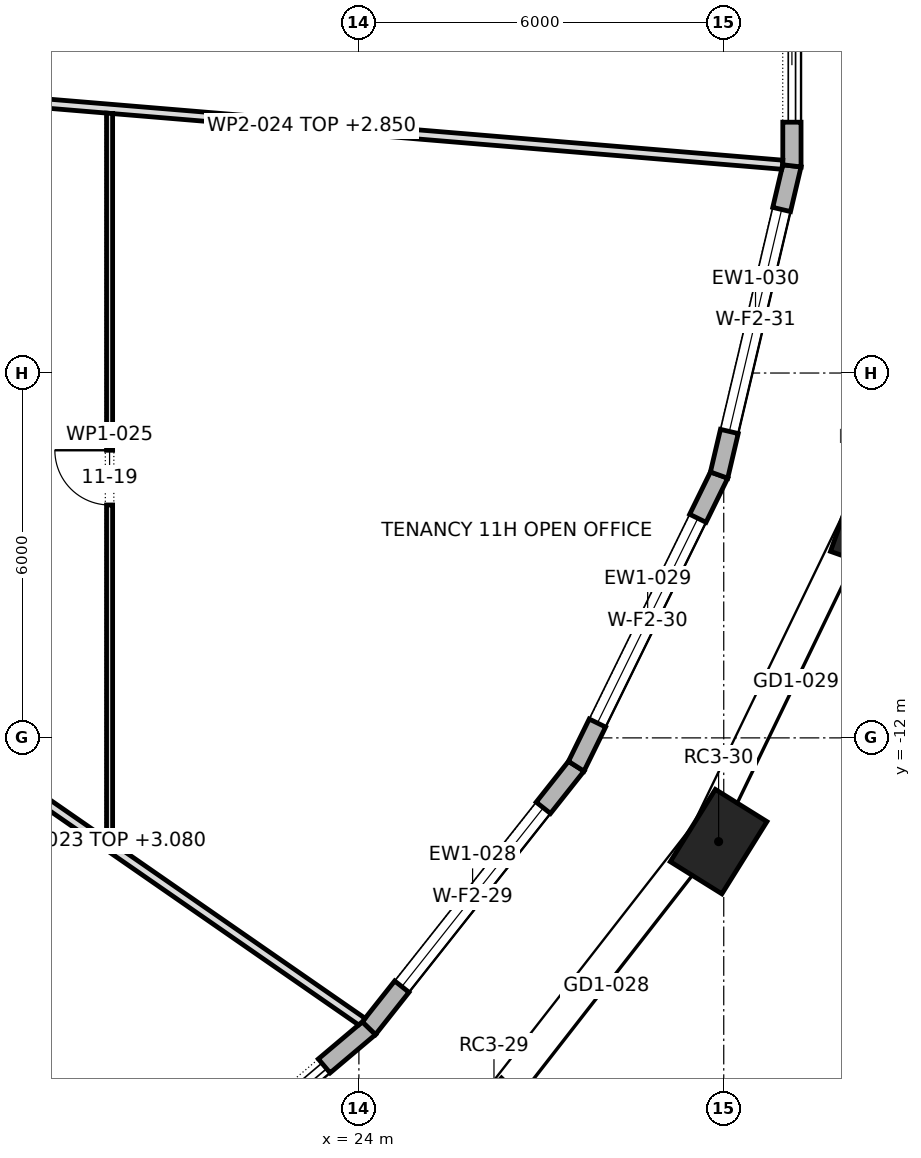
"""IFC4 building model, lengths in metres.
Left out: names, types, materials, properties, quantities, classifications, styles, units other than length and angle.
Written with IfcOpenShell. Run it as: python <this file> out.ifc"""

import sys

from ifc_helpers import new_model, si_unit, direction, frame, frame_2d, origin, origin_2d, place, context, subcontext, project, spatial, polyline, rectangle, outline, extrude, element, fill, save


model = new_model("IFC4")
c1 = context("Model", 3, precision=1e-05, world=origin(), true_north=direction((0.0, 1.0)))
c2 = subcontext(c1, "Body", "Model", "MODEL_VIEW")
j1 = project(units=[si_unit("LENGTHUNIT", "METRE"), si_unit("PLANEANGLEUNIT", "RADIAN")], contexts=[c1])
p1 = place(None, origin())
s1 = spatial("IfcSite", under=j1, at=p1, CompositionType="ELEMENT")
p2 = place(p1, origin())
s2 = spatial("IfcBuilding", under=s1, at=p2, CompositionType="ELEMENT")
p3 = place(p2, frame((0.0, 0.0, 163.3)))
s3 = spatial("IfcBuildingStorey", under=s2, at=p3, CompositionType="ELEMENT", Elevation=163.3)
for number, where, z_axis, x_axis in (
    (1, (26.221, -18.445, 0.0), (0.0, 0.0, 1.0), (0.692, 0.722, 0.0)),
    (2, (29.916, -13.706, 0.0), (0.0, 0.0, 1.0), (0.529, 0.849, 0.0)),
    (3, (32.46, -8.44, 0.0), (0.0, 0.0, 1.0), (0.334, 0.943, 0.0)),
):
    element("IfcColumn", number, at=place(p3, frame(where, z_axis=z_axis, x_axis=x_axis)), inside=s3, PredefinedType="COLUMN", context=c2, shape_type="SweptSolid", body=[
        extrude(rectangle(XDim=1.4, YDim=1.0, at=origin_2d()), origin(), (0.0, 0.0, 1.0), 4.2),
    ])
p4 = place(p3, frame((19.829, -20.435, 0.0), z_axis=(0.0, 0.0, 1.0), x_axis=(0.764076096085, 0.645126126732, 0.0)))
e4 = element("IfcWall", 4, at=p4, inside=s3, PredefinedType="STANDARD", context=c2, shape_type="SweptSolid", body=[
    extrude(outline(polyline([(-0.014, -0.15), (5.69, -0.15), (5.66, 0.15), (0.014, 0.15), (-0.014, -0.15)])), origin(), (0.0, 0.0, 1.0), 3.85),
])
p5 = place(p4, frame((0.962, 0.0, 0.0)))
e5 = element("IfcOpeningElement", 5, at=p5, cuts=e4, PredefinedType="OPENING", context=c2, shape_type="SweptSolid", body=[
    extrude(rectangle(XDim=3.75, YDim=3.45, at=frame_2d((1.875, 1.725))), frame((0.0, 0.162, 0.0), z_axis=(0.0, -1.0, 0.0), x_axis=(1.0, 0.0, 0.0)), (0.0, 0.0, 1.0), 0.324),
])
p6 = place(p3, frame((24.165, -16.774, 0.0), z_axis=(0.0, 0.0, 1.0), x_axis=(0.620577705153, 0.784144955902, 0.0)))
e6 = element("IfcWall", 6, at=p6, inside=s3, PredefinedType="STANDARD", context=c2, shape_type="SweptSolid", body=[
    extrude(outline(polyline([(-0.015, -0.15), (5.509, -0.15), (5.477, 0.15), (0.015, 0.15), (-0.015, -0.15)])), origin(), (0.0, 0.0, 1.0), 3.85),
])
p7 = place(p6, frame((0.871, 0.0, 0.6)))
e7 = element("IfcOpeningElement", 7, at=p7, cuts=e6, PredefinedType="OPENING", context=c2, shape_type="SweptSolid", body=[
    extrude(rectangle(XDim=3.75, YDim=2.85, at=frame_2d((1.875, 1.425))), frame((0.0, 0.162, 0.0), z_axis=(0.0, -1.0, 0.0), x_axis=(1.0, 0.0, 0.0)), (0.0, 0.0, 1.0), 0.324),
])
p8 = place(p3, frame((27.574, -12.467, 0.0), z_axis=(0.0, 0.0, 1.0), x_axis=(0.440444485575, 0.897779847806, 0.0)))
e8 = element("IfcWall", 8, at=p8, inside=s3, PredefinedType="STANDARD", context=c2, shape_type="SweptSolid", body=[
    extrude(outline(polyline([(-0.016, -0.15), (5.35, -0.15), (5.317, 0.15), (0.016, 0.15), (-0.016, -0.15)])), origin(), (0.0, 0.0, 1.0), 3.85),
])
p9 = place(p8, frame((0.792, 0.0, 0.6)))
e9 = element("IfcOpeningElement", 9, at=p9, cuts=e8, PredefinedType="OPENING", context=c2, shape_type="SweptSolid", body=[
    extrude(rectangle(XDim=3.75, YDim=2.85, at=frame_2d((1.875, 1.425))), frame((0.0, 0.162, 0.0), z_axis=(0.0, -1.0, 0.0), x_axis=(1.0, 0.0, 0.0)), (0.0, 0.0, 1.0), 0.324),
])
p10 = place(p3, frame((29.923, -7.678, 0.0), z_axis=(0.0, 0.0, 1.0), x_axis=(0.229297175564, 0.973356463624, 0.0)))
e10 = element("IfcWall", 10, at=p10, inside=s3, PredefinedType="STANDARD", context=c2, shape_type="SweptSolid", body=[
    extrude(outline(polyline([(-0.017, -0.15), (5.242, -0.15), (5.207, 0.15), (0.017, 0.15), (-0.017, -0.15)])), origin(), (0.0, 0.0, 1.0), 3.85),
])
p11 = place(p10, frame((0.737, 0.0, 0.6)))
e11 = element("IfcOpeningElement", 11, at=p11, cuts=e10, PredefinedType="OPENING", context=c2, shape_type="SweptSolid", body=[
    extrude(rectangle(XDim=3.75, YDim=2.85, at=frame_2d((1.875, 1.425))), frame((0.0, 0.162, 0.0), z_axis=(0.0, -1.0, 0.0), x_axis=(1.0, 0.0, 0.0)), (0.0, 0.0, 1.0), 0.324),
])
p12 = place(p3, frame((31.121, -2.593, 0.0), z_axis=(0.0, 0.0, 1.0), x_axis=(0.0, 1.0, 0.0)))
e12 = element("IfcWall", 12, at=p12, inside=s3, PredefinedType="STANDARD", context=c2, shape_type="SweptSolid", body=[
    extrude(outline(polyline([(-0.017, -0.15), (5.203, -0.15), (5.168, 0.15), (0.017, 0.15), (-0.017, -0.15)])), origin(), (0.0, 0.0, 1.0), 3.85),
])
p13 = place(p12, frame((0.718, 0.0, 0.0)))
e13 = element("IfcOpeningElement", 13, at=p13, cuts=e12, PredefinedType="OPENING", context=c2, shape_type="SweptSolid", body=[
    extrude(rectangle(XDim=3.75, YDim=3.45, at=frame_2d((1.875, 1.725))), frame((0.0, 0.162, 0.0), z_axis=(0.0, -1.0, 0.0), x_axis=(1.0, 0.0, 0.0)), (0.0, 0.0, 1.0), 0.324),
])
p14 = place(p3, frame((15.433, -10.692, 0.0), z_axis=(0.0, 0.0, 1.0), x_axis=(0.821818585553, -0.569749254006, 0.0)))
e14 = element("IfcWall", 14, at=p14, inside=s3, PredefinedType="PARTITIONING", context=c2, shape_type="SweptSolid", body=[
    extrude(outline(polyline([(0.104, -0.075), (1.832, -0.075), (3.56, -0.075), (5.288, -0.075), (7.016, -0.075), (8.744, -0.075), (10.472, -0.075), (10.493, 0.002), (10.497, 0.072), (10.497, 0.075), (8.773, 0.075), (7.049, 0.075), (5.325, 0.075), (5.324, 0.074), (5.323, 0.075), (3.549, 0.075), (1.774, 0.075), (0.0, 0.075), (0.0, 0.074), (0.104, -0.075)])), origin(), (0.0, 0.0, 1.0), 3.08),
])
p15 = place(p3, frame((15.469, -1.286, 0.0), z_axis=(0.0, 0.0, 1.0), x_axis=(0.996560145348, -0.082872653534, 0.0)))
e15 = element("IfcWall", 15, at=p15, inside=s3, PredefinedType="PARTITIONING", context=c2, shape_type="SweptSolid", body=[
    extrude(outline(polyline([(0.012, -0.075), (1.504, -0.075), (2.996, -0.075), (4.488, -0.075), (4.502, -0.074), (4.502, -0.075), (6.343, -0.075), (8.183, -0.075), (10.023, -0.075), (11.864, -0.075), (13.704, -0.075), (15.544, -0.075), (15.549, -0.045), (15.549, 0.075), (13.605, 0.075), (11.662, 0.075), (9.718, 0.075), (7.774, 0.075), (5.831, 0.075), (3.887, 0.075), (1.944, 0.075), (0.0, 0.075), (0.0, 0.07), (0.012, -0.075)])), origin(), (0.0, 0.0, 1.0), 2.85),
])
p16 = place(p3, frame((19.9, -1.726, 0.0), z_axis=(0.0, 0.0, 1.0), x_axis=(0.0, -1.0, 0.0)))
e16 = element("IfcWall", 16, at=p16, inside=s3, PredefinedType="PARTITIONING", context=c2, shape_type="SweptSolid", body=[
    extrude(outline(polyline([(0.0, -0.05), (1.99, -0.05), (3.979, -0.05), (5.969, -0.05), (7.959, -0.05), (9.948, -0.05), (11.938, -0.05), (12.007, 0.049), (12.007, 0.05), (10.007, 0.05), (8.007, 0.05), (6.007, 0.05), (4.008, 0.05), (2.008, 0.05), (0.008, 0.05), (0.0, -0.047), (0.0, -0.05)])), origin(), (0.0, 0.0, 1.0), 3.85),
])
p17 = place(p16, frame((5.544, 0.0, 0.0)))
e17 = element("IfcOpeningElement", 17, at=p17, cuts=e16, PredefinedType="OPENING", context=c2, shape_type="SweptSolid", body=[
    extrude(rectangle(XDim=0.9, YDim=2.1, at=frame_2d((0.45, 1.05))), frame((0.0, 0.062, 0.0), z_axis=(0.0, -1.0, 0.0), x_axis=(1.0, 0.0, 0.0)), (0.0, 0.0, 1.0), 0.124),
])
p18 = place(p5, origin())
e18 = element("IfcDoor", 18, at=p18, inside=s3, OperationType="DOUBLE_DOOR_SLIDING", PredefinedType="DOOR", context=c2, shape_type="SweptSolid", body=[
    extrude(rectangle(XDim=3.75, YDim=3.45, at=frame_2d((1.875, 1.725))), frame((0.0, 0.025, 0.0), z_axis=(0.0, -1.0, 0.0), x_axis=(1.0, 0.0, 0.0)), (0.0, 0.0, 1.0), 0.05),
])
fill(e5, e18)
p19 = place(p7, origin())
e19 = element("IfcWindow", 19, at=p19, inside=s3, PartitioningType="TRIPLE_PANEL_VERTICAL", PredefinedType="WINDOW", context=c2, shape_type="SweptSolid", body=[
    extrude(rectangle(XDim=3.75, YDim=2.85, at=frame_2d((1.875, 1.425))), frame((0.0, 0.03, 0.0), z_axis=(0.0, -1.0, 0.0), x_axis=(1.0, 0.0, 0.0)), (0.0, 0.0, 1.0), 0.06),
])
fill(e7, e19)
p20 = place(p9, origin())
e20 = element("IfcWindow", 20, at=p20, inside=s3, PartitioningType="TRIPLE_PANEL_VERTICAL", PredefinedType="WINDOW", context=c2, shape_type="SweptSolid", body=[
    extrude(rectangle(XDim=3.75, YDim=2.85, at=frame_2d((1.875, 1.425))), frame((0.0, 0.03, 0.0), z_axis=(0.0, -1.0, 0.0), x_axis=(1.0, 0.0, 0.0)), (0.0, 0.0, 1.0), 0.06),
])
fill(e9, e20)
p21 = place(p11, origin())
e21 = element("IfcWindow", 21, at=p21, inside=s3, PartitioningType="TRIPLE_PANEL_VERTICAL", PredefinedType="WINDOW", context=c2, shape_type="SweptSolid", body=[
    extrude(rectangle(XDim=3.75, YDim=2.85, at=frame_2d((1.875, 1.425))), frame((0.0, 0.03, 0.0), z_axis=(0.0, -1.0, 0.0), x_axis=(1.0, 0.0, 0.0)), (0.0, 0.0, 1.0), 0.06),
])
fill(e11, e21)
p22 = place(p13, origin())
e22 = element("IfcDoor", 22, at=p22, inside=s3, OperationType="DOUBLE_DOOR_SLIDING", PredefinedType="DOOR", context=c2, shape_type="SweptSolid", body=[
    extrude(rectangle(XDim=3.75, YDim=3.45, at=frame_2d((1.875, 1.725))), frame((0.0, 0.025, 0.0), z_axis=(0.0, -1.0, 0.0), x_axis=(1.0, 0.0, 0.0)), (0.0, 0.0, 1.0), 0.05),
])
fill(e13, e22)
p23 = place(p17, frame((0.9, 0.0, 0.0), z_axis=(0.0, 0.0, 1.0), x_axis=(-1.0, 0.0, 0.0)))
e23 = element("IfcDoor", 23, at=p23, inside=s3, OperationType="SINGLE_SWING_LEFT", PredefinedType="DOOR", context=c2, shape_type="SweptSolid", body=[
    extrude(rectangle(XDim=0.9, YDim=2.1, at=frame_2d((0.45, 1.05))), frame((0.0, 0.025, 0.0), z_axis=(0.0, -1.0, 0.0), x_axis=(1.0, 0.0, 0.0)), (0.0, 0.0, 1.0), 0.05),
])
fill(e17, e23)
save(model, sys.argv[1])
